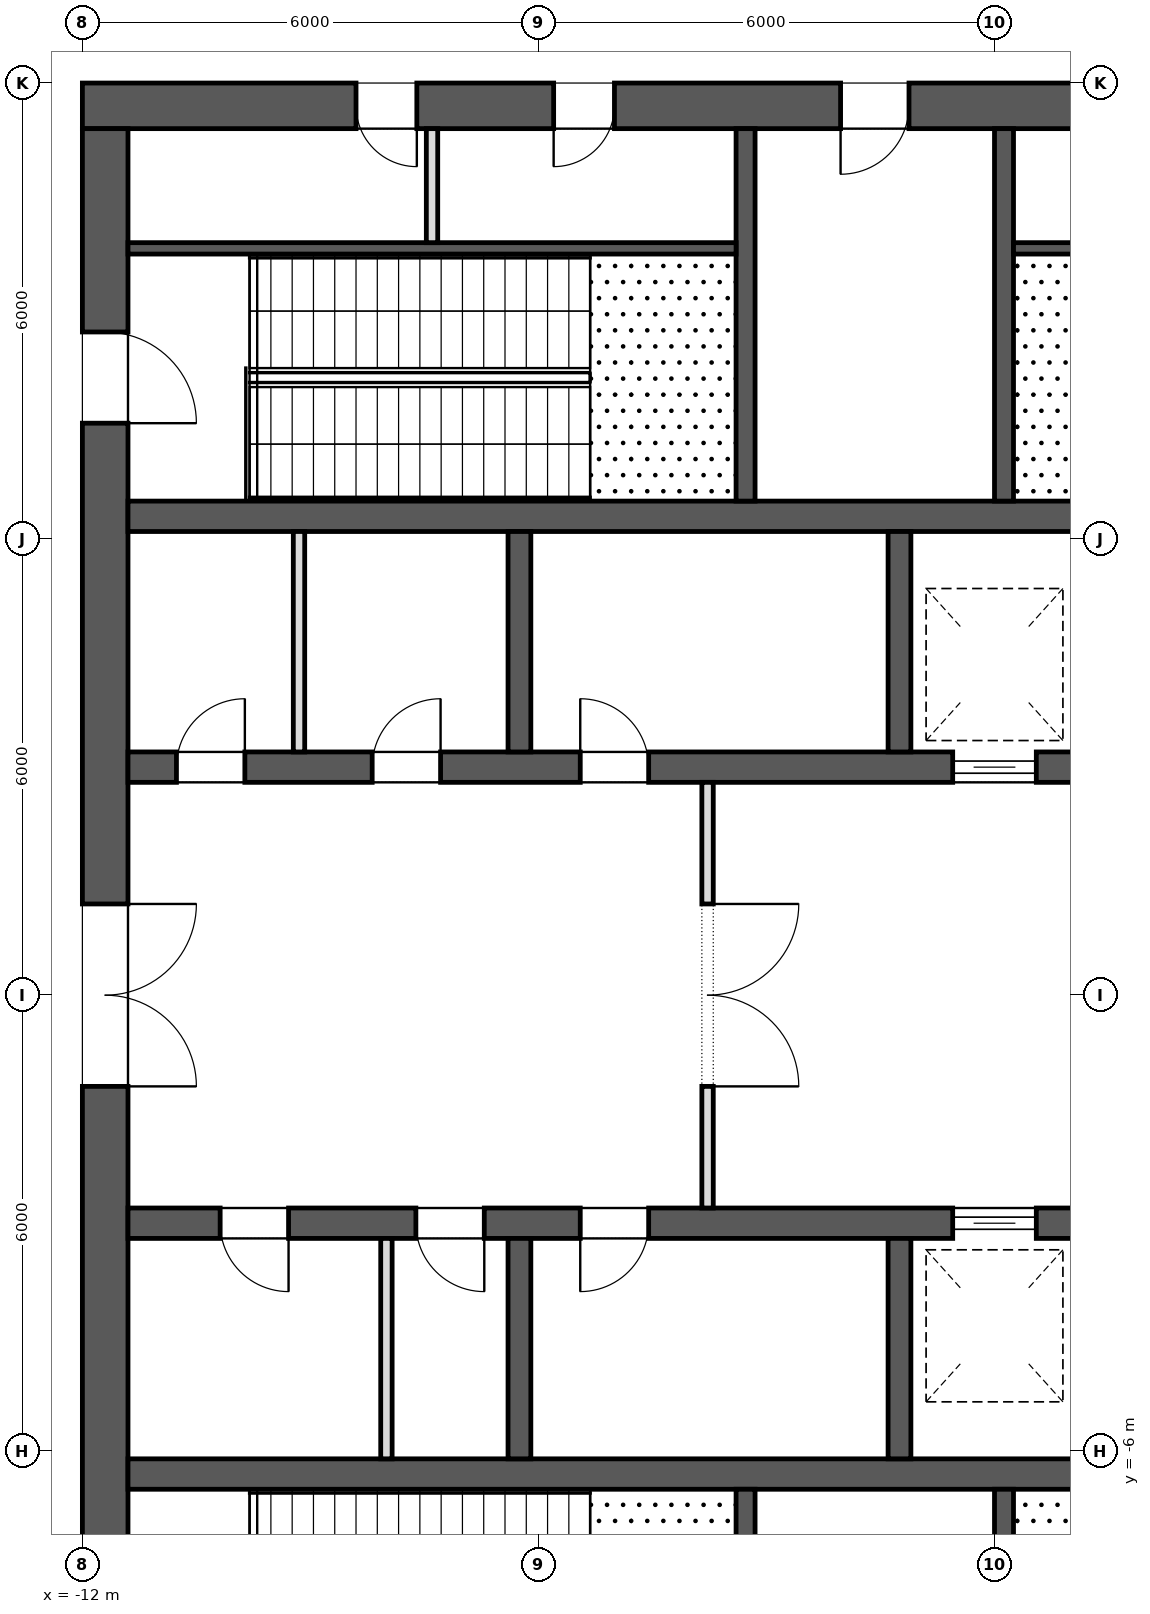
"""IFC4 building model, lengths in metres.
Left out: names, types, materials, properties, quantities, classifications, styles, units other than length and angle.
Written with IfcOpenShell. Run it as: python <this file> out.ifc"""

import sys

from ifc_helpers import new_model, si_unit, direction, frame, frame_2d, origin, place, context, subcontext, project, spatial, rectangle, extrude, element, fill, save


model = new_model("IFC4")
c1 = context("Model", 3, precision=1e-05, world=origin(), true_north=direction((0.0, 1.0)))
c2 = subcontext(c1, "Body", "Model", "MODEL_VIEW")
j1 = project(units=[si_unit("LENGTHUNIT", "METRE"), si_unit("PLANEANGLEUNIT", "RADIAN")], contexts=[c1])
p1 = place(None, origin())
s1 = spatial("IfcSite", under=j1, at=p1, CompositionType="ELEMENT")
p2 = place(p1, origin())
s2 = spatial("IfcBuilding", under=s1, at=p2, CompositionType="ELEMENT")
p3 = place(p2, frame((0.0, 0.0, 343.3)))
s3 = spatial("IfcBuildingStorey", under=s2, at=p3, CompositionType="ELEMENT", Elevation=343.3)
p4 = place(p3, frame((-12.0, 11.7, 0.0), z_axis=(0.0, 0.0, 1.0), x_axis=(1.0, 0.0, 0.0)))
e1 = element("IfcWall", 1, at=p4, inside=s3, PredefinedType="SHEAR", context=c2, shape_type="SweptSolid", body=[
    extrude(rectangle(XDim=24.0, YDim=0.6, at=frame_2d((12.0, 0.0))), origin(), (0.0, 0.0, 1.0), 6.0),
])
p5 = place(p4, frame((9.975, 0.0, 0.0)))
e2 = element("IfcOpeningElement", 2, at=p5, cuts=e1, PredefinedType="OPENING", context=c2, shape_type="SweptSolid", body=[
    extrude(rectangle(XDim=0.9, YDim=2.1, at=frame_2d((0.45, 1.05))), frame((0.0, 0.312, 0.0), z_axis=(0.0, -1.0, 0.0), x_axis=(1.0, 0.0, 0.0)), (0.0, 0.0, 1.0), 0.624),
])
p6 = place(p4, frame((3.6, 0.0, 0.0)))
e3 = element("IfcOpeningElement", 3, at=p6, cuts=e1, PredefinedType="OPENING", context=c2, shape_type="SweptSolid", body=[
    extrude(rectangle(XDim=0.8, YDim=2.1, at=frame_2d((0.4, 1.05))), frame((0.0, 0.312, 0.0), z_axis=(0.0, -1.0, 0.0), x_axis=(1.0, 0.0, 0.0)), (0.0, 0.0, 1.0), 0.624),
])
p7 = place(p4, frame((6.2, 0.0, 0.0)))
e4 = element("IfcOpeningElement", 4, at=p7, cuts=e1, PredefinedType="OPENING", context=c2, shape_type="SweptSolid", body=[
    extrude(rectangle(XDim=0.8, YDim=2.1, at=frame_2d((0.4, 1.05))), frame((0.0, 0.312, 0.0), z_axis=(0.0, -1.0, 0.0), x_axis=(1.0, 0.0, 0.0)), (0.0, 0.0, 1.0), 0.624),
])
p8 = place(p4, frame((15.85, 0.0, 0.0)))
e5 = element("IfcOpeningElement", 5, at=p8, cuts=e1, PredefinedType="OPENING", context=c2, shape_type="SweptSolid", body=[
    extrude(rectangle(XDim=0.8, YDim=2.1, at=frame_2d((0.4, 1.05))), frame((0.0, 0.312, 0.0), z_axis=(0.0, -1.0, 0.0), x_axis=(1.0, 0.0, 0.0)), (0.0, 0.0, 1.0), 0.624),
])
p9 = place(p3, frame((-11.7, -11.4, 0.0), z_axis=(0.0, 0.0, 1.0), x_axis=(0.0, 1.0, 0.0)))
e6 = element("IfcWall", 6, at=p9, inside=s3, PredefinedType="SHEAR", context=c2, shape_type="SweptSolid", body=[
    extrude(rectangle(XDim=22.8, YDim=0.6, at=frame_2d((11.4, 0.0))), origin(), (0.0, 0.0, 1.0), 6.0),
])
p10 = place(p9, frame((10.2, 0.0, 0.0)))
e7 = element("IfcOpeningElement", 7, at=p10, cuts=e6, PredefinedType="OPENING", context=c2, shape_type="SweptSolid", body=[
    extrude(rectangle(XDim=2.4, YDim=2.1, at=frame_2d((1.2, 1.05))), frame((0.0, 0.312, 0.0), z_axis=(0.0, -1.0, 0.0), x_axis=(1.0, 0.0, 0.0)), (0.0, 0.0, 1.0), 0.624),
])
p11 = place(p9, frame((18.925, 0.0, 0.0)))
e8 = element("IfcOpeningElement", 8, at=p11, cuts=e6, PredefinedType="OPENING", context=c2, shape_type="SweptSolid", body=[
    extrude(rectangle(XDim=1.2, YDim=2.1, at=frame_2d((0.6, 1.05))), frame((0.0, 0.312, 0.0), z_axis=(0.0, -1.0, 0.0), x_axis=(1.0, 0.0, 0.0)), (0.0, 0.0, 1.0), 0.624),
])
p12 = place(p9, frame((2.675, 0.0, 0.0)))
e9 = element("IfcOpeningElement", 9, at=p12, cuts=e6, PredefinedType="OPENING", context=c2, shape_type="SweptSolid", body=[
    extrude(rectangle(XDim=1.2, YDim=2.1, at=frame_2d((0.6, 1.05))), frame((0.0, 0.312, 0.0), z_axis=(0.0, -1.0, 0.0), x_axis=(1.0, 0.0, 0.0)), (0.0, 0.0, 1.0), 0.624),
])
p13 = place(p3, frame((-11.4, 3.0, 0.0), z_axis=(0.0, 0.0, 1.0), x_axis=(1.0, 0.0, 0.0)))
e10 = element("IfcWall", 10, at=p13, inside=s3, PredefinedType="SHEAR", context=c2, shape_type="SweptSolid", body=[
    extrude(rectangle(XDim=22.8, YDim=0.4, at=frame_2d((11.4, 0.0))), origin(), (0.0, 0.0, 1.0), 6.0),
])
p14 = place(p13, frame((10.85, 0.0, 0.0)))
e11 = element("IfcOpeningElement", 11, at=p14, cuts=e10, PredefinedType="OPENING", context=c2, shape_type="SweptSolid", body=[
    extrude(rectangle(XDim=1.1, YDim=2.1, at=frame_2d((0.55, 1.05))), frame((0.0, 0.212, 0.0), z_axis=(0.0, -1.0, 0.0), x_axis=(1.0, 0.0, 0.0)), (0.0, 0.0, 1.0), 0.424),
])
p15 = place(p13, frame((13.788, 0.0, 0.0)))
e12 = element("IfcOpeningElement", 12, at=p15, cuts=e10, PredefinedType="OPENING", context=c2, shape_type="SweptSolid", body=[
    extrude(rectangle(XDim=0.9, YDim=2.1, at=frame_2d((0.45, 1.05))), frame((0.0, 0.212, 0.0), z_axis=(0.0, -1.0, 0.0), x_axis=(1.0, 0.0, 0.0)), (0.0, 0.0, 1.0), 0.424),
])
p16 = place(p13, frame((16.212, 0.0, 0.0)))
e13 = element("IfcOpeningElement", 13, at=p16, cuts=e10, PredefinedType="OPENING", context=c2, shape_type="SweptSolid", body=[
    extrude(rectangle(XDim=0.9, YDim=2.1, at=frame_2d((0.45, 1.05))), frame((0.0, 0.212, 0.0), z_axis=(0.0, -1.0, 0.0), x_axis=(1.0, 0.0, 0.0)), (0.0, 0.0, 1.0), 0.424),
])
p17 = place(p13, frame((5.95, 0.0, 0.0)))
e14 = element("IfcOpeningElement", 14, at=p17, cuts=e10, PredefinedType="OPENING", context=c2, shape_type="SweptSolid", body=[
    extrude(rectangle(XDim=0.9, YDim=2.1, at=frame_2d((0.45, 1.05))), frame((0.0, 0.212, 0.0), z_axis=(0.0, -1.0, 0.0), x_axis=(1.0, 0.0, 0.0)), (0.0, 0.0, 1.0), 0.424),
])
p18 = place(p13, frame((0.637, 0.0, 0.0)))
e15 = element("IfcOpeningElement", 15, at=p18, cuts=e10, PredefinedType="OPENING", context=c2, shape_type="SweptSolid", body=[
    extrude(rectangle(XDim=0.9, YDim=2.1, at=frame_2d((0.45, 1.05))), frame((0.0, 0.212, 0.0), z_axis=(0.0, -1.0, 0.0), x_axis=(1.0, 0.0, 0.0)), (0.0, 0.0, 1.0), 0.424),
])
p19 = place(p13, frame((3.212, 0.0, 0.0)))
e16 = element("IfcOpeningElement", 16, at=p19, cuts=e10, PredefinedType="OPENING", context=c2, shape_type="SweptSolid", body=[
    extrude(rectangle(XDim=0.9, YDim=2.1, at=frame_2d((0.45, 1.05))), frame((0.0, 0.212, 0.0), z_axis=(0.0, -1.0, 0.0), x_axis=(1.0, 0.0, 0.0)), (0.0, 0.0, 1.0), 0.424),
])
p20 = place(p3, frame((-11.4, 6.3, 0.0), z_axis=(0.0, 0.0, 1.0), x_axis=(1.0, 0.0, 0.0)))
e17 = element("IfcWall", 17, at=p20, inside=s3, PredefinedType="SHEAR", context=c2, shape_type="SweptSolid", body=[
    extrude(rectangle(XDim=22.8, YDim=0.4, at=frame_2d((11.4, 0.0))), origin(), (0.0, 0.0, 1.0), 6.0),
])
p21 = place(p20, frame((20.85, 0.0, 0.0)))
e18 = element("IfcOpeningElement", 18, at=p21, cuts=e17, PredefinedType="OPENING", context=c2, shape_type="SweptSolid", body=[
    extrude(rectangle(XDim=1.1, YDim=2.1, at=frame_2d((0.55, 1.05))), frame((0.0, 0.212, 0.0), z_axis=(0.0, -1.0, 0.0), x_axis=(1.0, 0.0, 0.0)), (0.0, 0.0, 1.0), 0.424),
])
for number, where, z_axis, x_axis in (
    (19, (-6.25, 3.2, 0.0), (0.0, 0.0, 1.0), (0.0, 1.0, 0.0)),
    (20, (-1.25, 3.2, 0.0), (0.0, 0.0, 1.0), (0.0, 1.0, 0.0)),
):
    element("IfcWall", number, at=place(p3, frame(where, z_axis=z_axis, x_axis=x_axis)), inside=s3, PredefinedType="SHEAR", context=c2, shape_type="SweptSolid", body=[
        extrude(rectangle(XDim=2.9, YDim=0.3, at=frame_2d((1.45, 0.0))), origin(), (0.0, 0.0, 1.0), 6.0),
    ])
p22 = place(p3, frame((-11.4, -3.0, 0.0), z_axis=(0.0, 0.0, 1.0), x_axis=(1.0, 0.0, 0.0)))
e21 = element("IfcWall", 21, at=p22, inside=s3, PredefinedType="SHEAR", context=c2, shape_type="SweptSolid", body=[
    extrude(rectangle(XDim=22.8, YDim=0.4, at=frame_2d((11.4, 0.0))), origin(), (0.0, 0.0, 1.0), 6.0),
])
p23 = place(p22, frame((10.85, 0.0, 0.0)))
e22 = element("IfcOpeningElement", 22, at=p23, cuts=e21, PredefinedType="OPENING", context=c2, shape_type="SweptSolid", body=[
    extrude(rectangle(XDim=1.1, YDim=2.1, at=frame_2d((0.55, 1.05))), frame((0.0, 0.212, 0.0), z_axis=(0.0, -1.0, 0.0), x_axis=(1.0, 0.0, 0.0)), (0.0, 0.0, 1.0), 0.424),
])
p24 = place(p22, frame((13.137, 0.0, 0.0)))
e23 = element("IfcOpeningElement", 23, at=p24, cuts=e21, PredefinedType="OPENING", context=c2, shape_type="SweptSolid", body=[
    extrude(rectangle(XDim=0.8, YDim=2.1, at=frame_2d((0.4, 1.05))), frame((0.0, 0.212, 0.0), z_axis=(0.0, -1.0, 0.0), x_axis=(1.0, 0.0, 0.0)), (0.0, 0.0, 1.0), 0.424),
])
p25 = place(p22, frame((15.512, 0.0, 0.0)))
e24 = element("IfcOpeningElement", 24, at=p25, cuts=e21, PredefinedType="OPENING", context=c2, shape_type="SweptSolid", body=[
    extrude(rectangle(XDim=0.9, YDim=2.1, at=frame_2d((0.45, 1.05))), frame((0.0, 0.212, 0.0), z_axis=(0.0, -1.0, 0.0), x_axis=(1.0, 0.0, 0.0)), (0.0, 0.0, 1.0), 0.424),
])
p26 = place(p22, frame((5.95, 0.0, 0.0)))
e25 = element("IfcOpeningElement", 25, at=p26, cuts=e21, PredefinedType="OPENING", context=c2, shape_type="SweptSolid", body=[
    extrude(rectangle(XDim=0.9, YDim=2.1, at=frame_2d((0.45, 1.05))), frame((0.0, 0.212, 0.0), z_axis=(0.0, -1.0, 0.0), x_axis=(1.0, 0.0, 0.0)), (0.0, 0.0, 1.0), 0.424),
])
p27 = place(p22, frame((1.212, 0.0, 0.0)))
e26 = element("IfcOpeningElement", 26, at=p27, cuts=e21, PredefinedType="OPENING", context=c2, shape_type="SweptSolid", body=[
    extrude(rectangle(XDim=0.9, YDim=2.1, at=frame_2d((0.45, 1.05))), frame((0.0, 0.212, 0.0), z_axis=(0.0, -1.0, 0.0), x_axis=(1.0, 0.0, 0.0)), (0.0, 0.0, 1.0), 0.424),
])
p28 = place(p22, frame((3.788, 0.0, 0.0)))
e27 = element("IfcOpeningElement", 27, at=p28, cuts=e21, PredefinedType="OPENING", context=c2, shape_type="SweptSolid", body=[
    extrude(rectangle(XDim=0.9, YDim=2.1, at=frame_2d((0.45, 1.05))), frame((0.0, 0.212, 0.0), z_axis=(0.0, -1.0, 0.0), x_axis=(1.0, 0.0, 0.0)), (0.0, 0.0, 1.0), 0.424),
])
p29 = place(p3, frame((-11.4, -6.3, 0.0), z_axis=(0.0, 0.0, 1.0), x_axis=(1.0, 0.0, 0.0)))
e28 = element("IfcWall", 28, at=p29, inside=s3, PredefinedType="SHEAR", context=c2, shape_type="SweptSolid", body=[
    extrude(rectangle(XDim=22.8, YDim=0.4, at=frame_2d((11.4, 0.0))), origin(), (0.0, 0.0, 1.0), 6.0),
])
p30 = place(p29, frame((20.85, 0.0, 0.0)))
e29 = element("IfcOpeningElement", 29, at=p30, cuts=e28, PredefinedType="OPENING", context=c2, shape_type="SweptSolid", body=[
    extrude(rectangle(XDim=1.1, YDim=2.1, at=frame_2d((0.55, 1.05))), frame((0.0, 0.212, 0.0), z_axis=(0.0, -1.0, 0.0), x_axis=(1.0, 0.0, 0.0)), (0.0, 0.0, 1.0), 0.424),
])
for number, where, z_axis, x_axis in (
    (30, (-6.25, -6.1, 0.0), (0.0, 0.0, 1.0), (0.0, 1.0, 0.0)),
    (31, (-1.25, -6.1, 0.0), (0.0, 0.0, 1.0), (0.0, 1.0, 0.0)),
):
    element("IfcWall", number, at=place(p3, frame(where, z_axis=z_axis, x_axis=x_axis)), inside=s3, PredefinedType="SHEAR", context=c2, shape_type="SweptSolid", body=[
        extrude(rectangle(XDim=2.9, YDim=0.3, at=frame_2d((1.45, 0.0))), origin(), (0.0, 0.0, 1.0), 6.0),
    ])
for number, where, z_axis, x_axis in (
    (32, (-3.275, 6.5, 0.0), (0.0, 0.0, 1.0), (0.0, 1.0, 0.0)),
    (33, (0.125, 6.5, 0.0), (0.0, 0.0, 1.0), (0.0, 1.0, 0.0)),
):
    element("IfcWall", number, at=place(p3, frame(where, z_axis=z_axis, x_axis=x_axis)), inside=s3, PredefinedType="SHEAR", context=c2, shape_type="SweptSolid", body=[
        extrude(rectangle(XDim=4.9, YDim=0.25, at=frame_2d((2.45, 0.0))), origin(), (0.0, 0.0, 1.0), 5.65),
    ])
for number, where, z_axis, x_axis in (
    (34, (-11.4, 9.825, 0.0), (0.0, 0.0, 1.0), (1.0, 0.0, 0.0)),
    (35, (0.25, 9.825, 0.0), (0.0, 0.0, 1.0), (1.0, 0.0, 0.0)),
):
    element("IfcWall", number, at=place(p3, frame(where, z_axis=z_axis, x_axis=x_axis)), inside=s3, PredefinedType="SHEAR", context=c2, shape_type="SweptSolid", body=[
        extrude(rectangle(XDim=8.0, YDim=0.15, at=frame_2d((4.0, 0.0))), origin(), (0.0, 0.0, 1.0), 5.65),
    ])
p31 = place(p3, frame((-7.4, 9.9, 0.0), z_axis=(0.0, 0.0, 1.0), x_axis=(0.0, 1.0, 0.0)))
e36 = element("IfcWall", 36, at=p31, inside=s3, PredefinedType="PARTITIONING", context=c2, shape_type="SweptSolid", body=[
    extrude(rectangle(XDim=1.5, YDim=0.15, at=frame_2d((0.75, 0.0))), origin(), (0.0, 0.0, 1.0), 5.65),
])
for number, where, z_axis, x_axis in (
    (37, (-3.275, -11.4, 0.0), (0.0, 0.0, 1.0), (0.0, 1.0, 0.0)),
    (38, (0.125, -11.4, 0.0), (0.0, 0.0, 1.0), (0.0, 1.0, 0.0)),
):
    element("IfcWall", number, at=place(p3, frame(where, z_axis=z_axis, x_axis=x_axis)), inside=s3, PredefinedType="SHEAR", context=c2, shape_type="SweptSolid", body=[
        extrude(rectangle(XDim=4.9, YDim=0.25, at=frame_2d((2.45, 0.0))), origin(), (0.0, 0.0, 1.0), 5.65),
    ])
for number, where, z_axis, x_axis in (
    (39, (-9.15, 3.2, 0.0), (0.0, 0.0, 1.0), (0.0, 1.0, 0.0)),
    (40, (-8.0, -6.1, 0.0), (0.0, 0.0, 1.0), (0.0, 1.0, 0.0)),
):
    element("IfcWall", number, at=place(p3, frame(where, z_axis=z_axis, x_axis=x_axis)), inside=s3, PredefinedType="PARTITIONING", context=c2, shape_type="SweptSolid", body=[
        extrude(rectangle(XDim=2.9, YDim=0.15, at=frame_2d((1.45, 0.0))), origin(), (0.0, 0.0, 1.0), 5.65),
    ])
p32 = place(p3, frame((-3.775, -2.8, 0.0), z_axis=(0.0, 0.0, 1.0), x_axis=(0.0, 1.0, 0.0)))
e41 = element("IfcWall", 41, at=p32, inside=s3, PredefinedType="PARTITIONING", context=c2, shape_type="SweptSolid", body=[
    extrude(rectangle(XDim=5.6, YDim=0.15, at=frame_2d((2.8, 0.0))), origin(), (0.0, 0.0, 1.0), 5.65),
])
p33 = place(p32, frame((1.6, 0.0, 0.0)))
e42 = element("IfcOpeningElement", 42, at=p33, cuts=e41, PredefinedType="OPENING", context=c2, shape_type="SweptSolid", body=[
    extrude(rectangle(XDim=2.4, YDim=2.1, at=frame_2d((1.2, 1.05))), frame((0.0, 0.087, 0.0), z_axis=(0.0, -1.0, 0.0), x_axis=(1.0, 0.0, 0.0)), (0.0, 0.0, 1.0), 0.174),
])
p34 = place(p14, origin())
e43 = element("IfcDoor", 43, at=p34, inside=s3, OperationType="SLIDING_TO_LEFT", PredefinedType="DOOR", context=c2, shape_type="SweptSolid", body=[
    extrude(rectangle(XDim=1.1, YDim=2.1, at=frame_2d((0.55, 1.05))), frame((0.0, 0.025, 0.0), z_axis=(0.0, -1.0, 0.0), x_axis=(1.0, 0.0, 0.0)), (0.0, 0.0, 1.0), 0.05),
])
fill(e11, e43)
p35 = place(p23, origin())
e44 = element("IfcDoor", 44, at=p35, inside=s3, OperationType="SLIDING_TO_LEFT", PredefinedType="DOOR", context=c2, shape_type="SweptSolid", body=[
    extrude(rectangle(XDim=1.1, YDim=2.1, at=frame_2d((0.55, 1.05))), frame((0.0, 0.025, 0.0), z_axis=(0.0, -1.0, 0.0), x_axis=(1.0, 0.0, 0.0)), (0.0, 0.0, 1.0), 0.05),
])
fill(e22, e44)
p36 = place(p10, frame((2.4, 0.0, 0.0), z_axis=(0.0, 0.0, 1.0), x_axis=(-1.0, 0.0, 0.0)))
e45 = element("IfcDoor", 45, at=p36, inside=s3, OperationType="DOUBLE_DOOR_SINGLE_SWING", PredefinedType="DOOR", context=c2, shape_type="SweptSolid", body=[
    extrude(rectangle(XDim=2.4, YDim=2.1, at=frame_2d((1.2, 1.05))), frame((0.0, 0.025, 0.0), z_axis=(0.0, -1.0, 0.0), x_axis=(1.0, 0.0, 0.0)), (0.0, 0.0, 1.0), 0.05),
])
fill(e7, e45)
p37 = place(p33, frame((2.4, 0.0, 0.0), z_axis=(0.0, 0.0, 1.0), x_axis=(-1.0, 0.0, 0.0)))
e46 = element("IfcDoor", 46, at=p37, inside=s3, OperationType="DOUBLE_DOOR_SINGLE_SWING", PredefinedType="DOOR", context=c2, shape_type="SweptSolid", body=[
    extrude(rectangle(XDim=2.4, YDim=2.1, at=frame_2d((1.2, 1.05))), frame((0.0, 0.025, 0.0), z_axis=(0.0, -1.0, 0.0), x_axis=(1.0, 0.0, 0.0)), (0.0, 0.0, 1.0), 0.05),
])
fill(e42, e46)
p38 = place(p11, frame((1.2, 0.0, 0.0), z_axis=(0.0, 0.0, 1.0), x_axis=(-1.0, 0.0, 0.0)))
e47 = element("IfcDoor", 47, at=p38, inside=s3, OperationType="SINGLE_SWING_LEFT", PredefinedType="DOOR", context=c2, shape_type="SweptSolid", body=[
    extrude(rectangle(XDim=1.2, YDim=2.1, at=frame_2d((0.6, 1.05))), frame((0.0, 0.025, 0.0), z_axis=(0.0, -1.0, 0.0), x_axis=(1.0, 0.0, 0.0)), (0.0, 0.0, 1.0), 0.05),
])
fill(e8, e47)
p39 = place(p5, frame((0.9, 0.0, 0.0), z_axis=(0.0, 0.0, 1.0), x_axis=(-1.0, 0.0, 0.0)))
e48 = element("IfcDoor", 48, at=p39, inside=s3, OperationType="SINGLE_SWING_LEFT", PredefinedType="DOOR", context=c2, shape_type="SweptSolid", body=[
    extrude(rectangle(XDim=0.9, YDim=2.1, at=frame_2d((0.45, 1.05))), frame((0.0, 0.025, 0.0), z_axis=(0.0, -1.0, 0.0), x_axis=(1.0, 0.0, 0.0)), (0.0, 0.0, 1.0), 0.05),
])
fill(e2, e48)
p40 = place(p6, frame((0.8, 0.0, 0.0), z_axis=(0.0, 0.0, 1.0), x_axis=(-1.0, 0.0, 0.0)))
e49 = element("IfcDoor", 49, at=p40, inside=s3, OperationType="SINGLE_SWING_RIGHT", PredefinedType="DOOR", context=c2, shape_type="SweptSolid", body=[
    extrude(rectangle(XDim=0.8, YDim=2.1, at=frame_2d((0.4, 1.05))), frame((0.0, 0.025, 0.0), z_axis=(0.0, -1.0, 0.0), x_axis=(1.0, 0.0, 0.0)), (0.0, 0.0, 1.0), 0.05),
])
fill(e3, e49)
p41 = place(p7, frame((0.8, 0.0, 0.0), z_axis=(0.0, 0.0, 1.0), x_axis=(-1.0, 0.0, 0.0)))
e50 = element("IfcDoor", 50, at=p41, inside=s3, OperationType="SINGLE_SWING_LEFT", PredefinedType="DOOR", context=c2, shape_type="SweptSolid", body=[
    extrude(rectangle(XDim=0.8, YDim=2.1, at=frame_2d((0.4, 1.05))), frame((0.0, 0.025, 0.0), z_axis=(0.0, -1.0, 0.0), x_axis=(1.0, 0.0, 0.0)), (0.0, 0.0, 1.0), 0.05),
])
fill(e4, e50)
p42 = place(p17, origin())
e51 = element("IfcDoor", 51, at=p42, inside=s3, OperationType="SINGLE_SWING_RIGHT", PredefinedType="DOOR", context=c2, shape_type="SweptSolid", body=[
    extrude(rectangle(XDim=0.9, YDim=2.1, at=frame_2d((0.45, 1.05))), frame((0.0, 0.025, 0.0), z_axis=(0.0, -1.0, 0.0), x_axis=(1.0, 0.0, 0.0)), (0.0, 0.0, 1.0), 0.05),
])
fill(e14, e51)
p43 = place(p18, origin())
e52 = element("IfcDoor", 52, at=p43, inside=s3, OperationType="SINGLE_SWING_LEFT", PredefinedType="DOOR", context=c2, shape_type="SweptSolid", body=[
    extrude(rectangle(XDim=0.9, YDim=2.1, at=frame_2d((0.45, 1.05))), frame((0.0, 0.025, 0.0), z_axis=(0.0, -1.0, 0.0), x_axis=(1.0, 0.0, 0.0)), (0.0, 0.0, 1.0), 0.05),
])
fill(e15, e52)
p44 = place(p19, origin())
e53 = element("IfcDoor", 53, at=p44, inside=s3, OperationType="SINGLE_SWING_LEFT", PredefinedType="DOOR", context=c2, shape_type="SweptSolid", body=[
    extrude(rectangle(XDim=0.9, YDim=2.1, at=frame_2d((0.45, 1.05))), frame((0.0, 0.025, 0.0), z_axis=(0.0, -1.0, 0.0), x_axis=(1.0, 0.0, 0.0)), (0.0, 0.0, 1.0), 0.05),
])
fill(e16, e53)
p45 = place(p26, frame((0.9, 0.0, 0.0), z_axis=(0.0, 0.0, 1.0), x_axis=(-1.0, 0.0, 0.0)))
e54 = element("IfcDoor", 54, at=p45, inside=s3, OperationType="SINGLE_SWING_LEFT", PredefinedType="DOOR", context=c2, shape_type="SweptSolid", body=[
    extrude(rectangle(XDim=0.9, YDim=2.1, at=frame_2d((0.45, 1.05))), frame((0.0, 0.025, 0.0), z_axis=(0.0, -1.0, 0.0), x_axis=(1.0, 0.0, 0.0)), (0.0, 0.0, 1.0), 0.05),
])
fill(e25, e54)
p46 = place(p27, frame((0.9, 0.0, 0.0), z_axis=(0.0, 0.0, 1.0), x_axis=(-1.0, 0.0, 0.0)))
e55 = element("IfcDoor", 55, at=p46, inside=s3, OperationType="SINGLE_SWING_RIGHT", PredefinedType="DOOR", context=c2, shape_type="SweptSolid", body=[
    extrude(rectangle(XDim=0.9, YDim=2.1, at=frame_2d((0.45, 1.05))), frame((0.0, 0.025, 0.0), z_axis=(0.0, -1.0, 0.0), x_axis=(1.0, 0.0, 0.0)), (0.0, 0.0, 1.0), 0.05),
])
fill(e26, e55)
p47 = place(p28, frame((0.9, 0.0, 0.0), z_axis=(0.0, 0.0, 1.0), x_axis=(-1.0, 0.0, 0.0)))
e56 = element("IfcDoor", 56, at=p47, inside=s3, OperationType="SINGLE_SWING_RIGHT", PredefinedType="DOOR", context=c2, shape_type="SweptSolid", body=[
    extrude(rectangle(XDim=0.9, YDim=2.1, at=frame_2d((0.45, 1.05))), frame((0.0, 0.025, 0.0), z_axis=(0.0, -1.0, 0.0), x_axis=(1.0, 0.0, 0.0)), (0.0, 0.0, 1.0), 0.05),
])
fill(e27, e56)
save(model, sys.argv[1])
